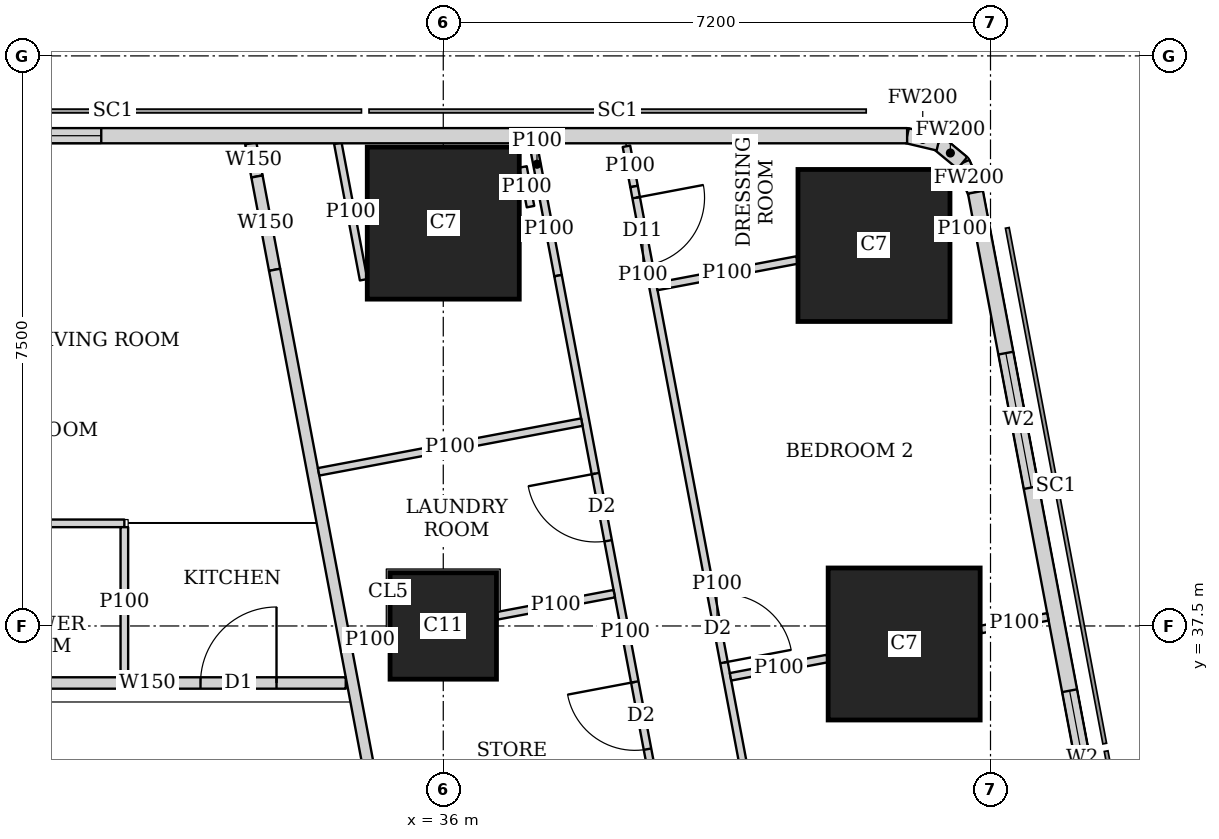
"""IFC4 building model, lengths in metres.
Left out: names, types, materials, properties, quantities, classifications, styles, units other than length and angle.
Written with IfcOpenShell. Run it as: python <this file> out.ifc"""

import sys

from ifc_helpers import new_model, si_unit, direction, frame, frame_2d, origin, origin_2d, place, context, subcontext, project, spatial, rectangle, extrude, element, fill, save


model = new_model("IFC4")
c1 = context("Model", 3, precision=1e-05, world=origin(), true_north=direction((0.0, 1.0)))
c2 = subcontext(c1, "Body", "Model", "MODEL_VIEW")
j1 = project(units=[si_unit("LENGTHUNIT", "METRE"), si_unit("PLANEANGLEUNIT", "RADIAN")], contexts=[c1])
p1 = place(None, origin())
s1 = spatial("IfcSite", under=j1, at=p1, CompositionType="ELEMENT")
p2 = place(p1, origin())
s2 = spatial("IfcBuilding", under=s1, at=p2, CompositionType="ELEMENT")
p3 = place(p2, frame((0.0, 0.0, 274.1)))
s3 = spatial("IfcBuildingStorey", under=s2, at=p3, CompositionType="ELEMENT", Elevation=274.1)
p4 = place(p3, frame((36.0, 37.5, 0.0), z_axis=(0.0, 0.0, 1.0), x_axis=(1.0, 0.0, 0.0)))
e1 = element("IfcColumn", 1, at=p4, inside=s3, PredefinedType="COLUMN", context=c2, shape_type="SweptSolid", body=[
    extrude(rectangle(XDim=1.4, YDim=1.4, at=origin_2d()), origin(), (0.0, 0.0, 1.0), 3.75),
])
for number, where, z_axis, x_axis in (
    (2, (42.064, 37.263, 0.0), (0.0, 0.0, 1.0), (1.0, 0.0, 0.0)),
    (3, (36.0, 42.8, 0.0), (0.0, 0.0, 1.0), (1.0, 0.0, 0.0)),
    (4, (41.667, 42.506, 0.0), (0.0, 0.0, 1.0), (1.0, 0.0, 0.0)),
):
    element("IfcColumn", number, at=place(p3, frame(where, z_axis=z_axis, x_axis=x_axis)), inside=s3, PredefinedType="COLUMN", context=c2, shape_type="SweptSolid", body=[
        extrude(rectangle(XDim=2.0, YDim=2.0, at=origin_2d()), origin(), (0.0, 0.0, 1.0), 3.75),
    ])
p5 = place(p3, frame((49.684, 7.832, 0.0), z_axis=(0.0, 0.0, 1.0), x_axis=(-0.185616669694, 0.982622232565, 0.0)))
e5 = element("IfcWall", 5, at=p5, inside=s3, PredefinedType="SOLIDWALL", context=c2, shape_type="SweptSolid", body=[
    extrude(rectangle(XDim=36.0, YDim=0.2, at=frame_2d((18.0, 0.0))), origin(), (0.0, 0.0, 1.0), 3.5),
])
p6 = place(p5, frame((2.518, 0.0, 0.9)))
e6 = element("IfcOpeningElement", 6, at=p6, cuts=e5, PredefinedType="OPENING", context=c2, shape_type="SweptSolid", body=[
    extrude(rectangle(XDim=2.4, YDim=1.5, at=frame_2d((1.2, 0.75))), frame((0.0, 0.11, 0.0), z_axis=(0.0, -1.0, 0.0), x_axis=(1.0, 0.0, 0.0)), (0.0, 0.0, 1.0), 0.22),
])
p7 = place(p5, frame((8.444, 0.0, 0.9)))
e7 = element("IfcOpeningElement", 7, at=p7, cuts=e5, PredefinedType="OPENING", context=c2, shape_type="SweptSolid", body=[
    extrude(rectangle(XDim=1.8, YDim=1.5, at=frame_2d((0.9, 0.75))), frame((0.0, 0.11, 0.0), z_axis=(0.0, -1.0, 0.0), x_axis=(1.0, 0.0, 0.0)), (0.0, 0.0, 1.0), 0.22),
])
p8 = place(p5, frame((12.261, 0.0, 0.9)))
e8 = element("IfcOpeningElement", 8, at=p8, cuts=e5, PredefinedType="OPENING", context=c2, shape_type="SweptSolid", body=[
    extrude(rectangle(XDim=1.8, YDim=1.5, at=frame_2d((0.9, 0.75))), frame((0.0, 0.11, 0.0), z_axis=(0.0, -1.0, 0.0), x_axis=(1.0, 0.0, 0.0)), (0.0, 0.0, 1.0), 0.22),
])
p9 = place(p5, frame((16.078, 0.0, 0.9)))
e9 = element("IfcOpeningElement", 9, at=p9, cuts=e5, PredefinedType="OPENING", context=c2, shape_type="SweptSolid", body=[
    extrude(rectangle(XDim=1.8, YDim=1.5, at=frame_2d((0.9, 0.75))), frame((0.0, 0.11, 0.0), z_axis=(0.0, -1.0, 0.0), x_axis=(1.0, 0.0, 0.0)), (0.0, 0.0, 1.0), 0.22),
])
p10 = place(p5, frame((19.894, 0.0, 0.9)))
e10 = element("IfcOpeningElement", 10, at=p10, cuts=e5, PredefinedType="OPENING", context=c2, shape_type="SweptSolid", body=[
    extrude(rectangle(XDim=1.8, YDim=1.5, at=frame_2d((0.9, 0.75))), frame((0.0, 0.11, 0.0), z_axis=(0.0, -1.0, 0.0), x_axis=(1.0, 0.0, 0.0)), (0.0, 0.0, 1.0), 0.22),
])
p11 = place(p5, frame((23.71, 0.0, 0.9)))
e11 = element("IfcOpeningElement", 11, at=p11, cuts=e5, PredefinedType="OPENING", context=c2, shape_type="SweptSolid", body=[
    extrude(rectangle(XDim=1.8, YDim=1.5, at=frame_2d((0.9, 0.75))), frame((0.0, 0.11, 0.0), z_axis=(0.0, -1.0, 0.0), x_axis=(1.0, 0.0, 0.0)), (0.0, 0.0, 1.0), 0.22),
])
p12 = place(p5, frame((27.526, 0.0, 0.9)))
e12 = element("IfcOpeningElement", 12, at=p12, cuts=e5, PredefinedType="OPENING", context=c2, shape_type="SweptSolid", body=[
    extrude(rectangle(XDim=1.8, YDim=1.5, at=frame_2d((0.9, 0.75))), frame((0.0, 0.11, 0.0), z_axis=(0.0, -1.0, 0.0), x_axis=(1.0, 0.0, 0.0)), (0.0, 0.0, 1.0), 0.22),
])
p13 = place(p5, frame((32.046, 0.0, 0.9)))
e13 = element("IfcOpeningElement", 13, at=p13, cuts=e5, PredefinedType="OPENING", context=c2, shape_type="SweptSolid", body=[
    extrude(rectangle(XDim=1.8, YDim=1.5, at=frame_2d((0.9, 0.75))), frame((0.0, 0.11, 0.0), z_axis=(0.0, -1.0, 0.0), x_axis=(1.0, 0.0, 0.0)), (0.0, 0.0, 1.0), 0.22),
])
p14 = place(p3, frame((43.002, 43.206, 0.0), z_axis=(0.0, 0.0, 1.0), x_axis=(-0.40678170573, 0.913525393124, 0.0)))
e14 = element("IfcWall", 14, at=p14, inside=s3, PredefinedType="SOLIDWALL", context=c2, shape_type="SweptSolid", body=[
    extrude(rectangle(XDim=0.423, YDim=0.2, at=frame_2d((0.211, 0.0))), origin(), (0.0, 0.0, 1.0), 3.5),
])
p15 = place(p3, frame((42.83, 43.592, 0.0), z_axis=(0.0, 0.0, 1.0), x_axis=(-0.771190539797, 0.636604391539, 0.0)))
e15 = element("IfcWall", 15, at=p15, inside=s3, PredefinedType="SOLIDWALL", context=c2, shape_type="SweptSolid", body=[
    extrude(rectangle(XDim=0.41, YDim=0.2, at=frame_2d((0.205, 0.0))), origin(), (0.0, 0.0, 1.0), 3.5),
])
p16 = place(p3, frame((42.514, 43.853, 0.0), z_axis=(0.0, 0.0, 1.0), x_axis=(-0.973288080424, 0.229587265555, 0.0)))
e16 = element("IfcWall", 16, at=p16, inside=s3, PredefinedType="SOLIDWALL", context=c2, shape_type="SweptSolid", body=[
    extrude(rectangle(XDim=0.422, YDim=0.2, at=frame_2d((0.211, 0.0))), origin(), (0.0, 0.0, 1.0), 3.5),
])
p17 = place(p3, frame((42.103, 43.95, 0.0), z_axis=(0.0, 0.0, 1.0), x_axis=(-1.0, 0.0, 0.0)))
e17 = element("IfcWall", 17, at=p17, inside=s3, PredefinedType="SOLIDWALL", context=c2, shape_type="SweptSolid", body=[
    extrude(rectangle(XDim=27.54, YDim=0.2, at=frame_2d((13.77, 0.0))), origin(), (0.0, 0.0, 1.0), 3.5),
])
p18 = place(p17, frame((10.603, 0.0, 0.9)))
e18 = element("IfcOpeningElement", 18, at=p18, cuts=e17, PredefinedType="OPENING", context=c2, shape_type="SweptSolid", body=[
    extrude(rectangle(XDim=1.8, YDim=1.5, at=frame_2d((0.9, 0.75))), frame((0.0, 0.11, 0.0), z_axis=(0.0, -1.0, 0.0), x_axis=(1.0, 0.0, 0.0)), (0.0, 0.0, 1.0), 0.22),
])
p19 = place(p17, frame((14.203, 0.0, 0.9)))
e19 = element("IfcOpeningElement", 19, at=p19, cuts=e17, PredefinedType="OPENING", context=c2, shape_type="SweptSolid", body=[
    extrude(rectangle(XDim=1.8, YDim=1.5, at=frame_2d((0.9, 0.75))), frame((0.0, 0.11, 0.0), z_axis=(0.0, -1.0, 0.0), x_axis=(1.0, 0.0, 0.0)), (0.0, 0.0, 1.0), 0.22),
])
p20 = place(p17, frame((17.803, 0.0, 0.9)))
e20 = element("IfcOpeningElement", 20, at=p20, cuts=e17, PredefinedType="OPENING", context=c2, shape_type="SweptSolid", body=[
    extrude(rectangle(XDim=1.8, YDim=1.5, at=frame_2d((0.9, 0.75))), frame((0.0, 0.11, 0.0), z_axis=(0.0, -1.0, 0.0), x_axis=(1.0, 0.0, 0.0)), (0.0, 0.0, 1.0), 0.22),
])
p21 = place(p17, frame((22.822, 0.0, 0.9)))
e21 = element("IfcOpeningElement", 21, at=p21, cuts=e17, PredefinedType="OPENING", context=c2, shape_type="SweptSolid", body=[
    extrude(rectangle(XDim=2.4, YDim=1.5, at=frame_2d((1.2, 0.75))), frame((0.0, 0.11, 0.0), z_axis=(0.0, -1.0, 0.0), x_axis=(1.0, 0.0, 0.0)), (0.0, 0.0, 1.0), 0.22),
])
p22 = place(p3, frame((29.501, 36.75, 0.0), z_axis=(0.0, 0.0, 1.0), x_axis=(1.0, 0.0, 0.0)))
e22 = element("IfcWall", 22, at=p22, inside=s3, PredefinedType="SOLIDWALL", context=c2, shape_type="SweptSolid", body=[
    extrude(rectangle(XDim=5.216, YDim=0.15, at=frame_2d((2.608, 0.0))), origin(), (0.0, 0.0, 1.0), 3.5),
])
p23 = place(p22, frame((3.305, 0.0, 0.0)))
e23 = element("IfcOpeningElement", 23, at=p23, cuts=e22, PredefinedType="OPENING", context=c2, shape_type="SweptSolid", body=[
    extrude(rectangle(XDim=1.0, YDim=2.1, at=frame_2d((0.5, 1.05))), frame((0.0, 0.085, 0.0), z_axis=(0.0, -1.0, 0.0), x_axis=(1.0, 0.0, 0.0)), (0.0, 0.0, 1.0), 0.17),
])
p24 = place(p3, frame((33.467, 43.85, 0.0), z_axis=(0.0, 0.0, 1.0), x_axis=(0.184886516626, -0.982759877066, 0.0)))
e24 = element("IfcWall", 24, at=p24, inside=s3, PredefinedType="SOLIDWALL", context=c2, shape_type="SweptSolid", body=[
    extrude(rectangle(XDim=0.444, YDim=0.15, at=frame_2d((0.222, 0.0))), origin(), (0.0, 0.0, 1.0), 3.5),
])
p25 = place(p3, frame((33.549, 43.414, 0.0), z_axis=(0.0, 0.0, 1.0), x_axis=(0.185585816539, -0.982628060204, 0.0)))
e25 = element("IfcWall", 25, at=p25, inside=s3, PredefinedType="SOLIDWALL", context=c2, shape_type="SweptSolid", body=[
    extrude(rectangle(XDim=1.25, YDim=0.15, at=frame_2d((0.625, 0.0))), origin(), (0.0, 0.0, 1.0), 2.05),
])
p26 = place(p3, frame((33.781, 42.186, 0.0), z_axis=(0.0, 0.0, 1.0), x_axis=(0.185593518645, -0.9826266055, 0.0)))
e26 = element("IfcWall", 26, at=p26, inside=s3, PredefinedType="SOLIDWALL", context=c2, shape_type="SweptSolid", body=[
    extrude(rectangle(XDim=35.961, YDim=0.15, at=frame_2d((17.98, 0.0))), origin(), (0.0, 0.0, 1.0), 2.5),
])
p27 = place(p26, frame((11.76, 0.0, 0.0)))
e27 = element("IfcOpeningElement", 27, at=p27, cuts=e26, PredefinedType="OPENING", context=c2, shape_type="SweptSolid", body=[
    extrude(rectangle(XDim=1.0, YDim=2.1, at=frame_2d((0.5, 1.05))), frame((0.0, 0.085, 0.0), z_axis=(0.0, -1.0, 0.0), x_axis=(1.0, 0.0, 0.0)), (0.0, 0.0, 1.0), 0.17),
])
p28 = place(p26, frame((15.576, 0.0, 0.0)))
e28 = element("IfcOpeningElement", 28, at=p28, cuts=e26, PredefinedType="OPENING", context=c2, shape_type="SweptSolid", body=[
    extrude(rectangle(XDim=1.0, YDim=2.1, at=frame_2d((0.5, 1.05))), frame((0.0, 0.085, 0.0), z_axis=(0.0, -1.0, 0.0), x_axis=(1.0, 0.0, 0.0)), (0.0, 0.0, 1.0), 0.17),
])
p29 = place(p26, frame((30.502, 0.0, 0.0)))
e29 = element("IfcOpeningElement", 29, at=p29, cuts=e26, PredefinedType="OPENING", context=c2, shape_type="SweptSolid", body=[
    extrude(rectangle(XDim=1.0, YDim=2.1, at=frame_2d((0.5, 1.05))), frame((0.0, 0.085, 0.0), z_axis=(0.0, -1.0, 0.0), x_axis=(1.0, 0.0, 0.0)), (0.0, 0.0, 1.0), 0.17),
])
p30 = place(p3, frame((34.952, 42.055, 0.0), z_axis=(0.0, 0.0, 1.0), x_axis=(-0.185490642006, 0.98264603074, 0.0)))
e30 = element("IfcWall", 30, at=p30, inside=s3, PredefinedType="PARTITIONING", context=c2, shape_type="SweptSolid", body=[
    extrude(rectangle(XDim=1.827, YDim=0.1, at=frame_2d((0.914, 0.0))), origin(), (0.0, 0.0, 1.0), 2.05),
])
p31 = place(p3, frame((37.049, 43.539, 0.0), z_axis=(0.0, 0.0, 1.0), x_axis=(0.186119495745, -0.982527115811, 0.0)))
e31 = element("IfcWall", 31, at=p31, inside=s3, PredefinedType="PARTITIONING", context=c2, shape_type="SweptSolid", body=[
    extrude(rectangle(XDim=0.531, YDim=0.1, at=frame_2d((0.266, 0.0))), origin(), (0.0, 0.0, 1.0), 2.05),
])
p32 = place(p3, frame((38.41, 43.811, 0.0), z_axis=(0.0, 0.0, 1.0), x_axis=(0.185903499302, -0.982568007289, 0.0)))
e32 = element("IfcWall", 32, at=p32, inside=s3, PredefinedType="PARTITIONING", context=c2, shape_type="SweptSolid", body=[
    extrude(rectangle(XDim=0.538, YDim=0.1, at=frame_2d((0.269, 0.0))), origin(), (0.0, 0.0, 1.0), 3.5),
])
p33 = place(p3, frame((38.51, 43.282, 0.0), z_axis=(0.0, 0.0, 1.0), x_axis=(0.185775287495, -0.982592256511, 0.0)))
e33 = element("IfcWall", 33, at=p33, inside=s3, PredefinedType="PARTITIONING", context=c2, shape_type="SweptSolid", body=[
    extrude(rectangle(XDim=1.259, YDim=0.1, at=frame_2d((0.629, 0.0))), origin(), (0.0, 0.0, 1.0), 2.05),
])
p34 = place(p33, frame((0.15, 0.0, 0.0)))
e34 = element("IfcOpeningElement", 34, at=p34, cuts=e33, PredefinedType="OPENING", context=c2, shape_type="SweptSolid", body=[
    extrude(rectangle(XDim=0.9, YDim=2.0, at=frame_2d((0.45, 1.0))), frame((0.0, 0.06, 0.0), z_axis=(0.0, -1.0, 0.0), x_axis=(1.0, 0.0, 0.0)), (0.0, 0.0, 1.0), 0.12),
])
p35 = place(p3, frame((38.744, 42.045, 0.0), z_axis=(0.0, 0.0, 1.0), x_axis=(0.185588352162, -0.982627581305, 0.0)))
e35 = element("IfcWall", 35, at=p35, inside=s3, PredefinedType="PARTITIONING", context=c2, shape_type="SweptSolid", body=[
    extrude(rectangle(XDim=9.241, YDim=0.1, at=frame_2d((4.621, 0.0))), origin(), (0.0, 0.0, 1.0), 3.5),
])
p36 = place(p35, frame((8.191, 0.0, 0.0)))
e36 = element("IfcOpeningElement", 36, at=p36, cuts=e35, PredefinedType="OPENING", context=c2, shape_type="SweptSolid", body=[
    extrude(rectangle(XDim=0.9, YDim=2.1, at=frame_2d((0.45, 1.05))), frame((0.0, 0.06, 0.0), z_axis=(0.0, -1.0, 0.0), x_axis=(1.0, 0.0, 0.0)), (0.0, 0.0, 1.0), 0.12),
])
p37 = place(p35, frame((4.215, 0.0, 0.0)))
e37 = element("IfcOpeningElement", 37, at=p37, cuts=e35, PredefinedType="OPENING", context=c2, shape_type="SweptSolid", body=[
    extrude(rectangle(XDim=0.9, YDim=2.1, at=frame_2d((0.45, 1.05))), frame((0.0, 0.06, 0.0), z_axis=(0.0, -1.0, 0.0), x_axis=(1.0, 0.0, 0.0)), (0.0, 0.0, 1.0), 0.12),
])
p38 = place(p3, frame((37.19, 43.803, 0.0), z_axis=(0.0, 0.0, 1.0), x_axis=(0.18479566844, -0.982776963978, 0.0)))
e38 = element("IfcWall", 38, at=p38, inside=s3, PredefinedType="PARTITIONING", context=c2, shape_type="SweptSolid", body=[
    extrude(rectangle(XDim=0.465, YDim=0.1, at=frame_2d((0.232, 0.0))), origin(), (0.0, 0.0, 1.0), 3.5),
])
p39 = place(p3, frame((37.276, 43.346, 0.0), z_axis=(0.0, 0.0, 1.0), x_axis=(0.185962504646, -0.982556841544, 0.0)))
e39 = element("IfcWall", 39, at=p39, inside=s3, PredefinedType="PARTITIONING", context=c2, shape_type="SweptSolid", body=[
    extrude(rectangle(XDim=1.259, YDim=0.1, at=frame_2d((0.629, 0.0))), origin(), (0.0, 0.0, 1.0), 2.05),
])
p40 = place(p3, frame((37.51, 42.109, 0.0), z_axis=(0.0, 0.0, 1.0), x_axis=(0.185659798122, -0.982614084654, 0.0)))
e40 = element("IfcWall", 40, at=p40, inside=s3, PredefinedType="PARTITIONING", context=c2, shape_type="SweptSolid", body=[
    extrude(rectangle(XDim=9.534, YDim=0.1, at=frame_2d((4.767, 0.0))), origin(), (0.0, 0.0, 1.0), 3.5),
])
p41 = place(p40, frame((8.109, 0.0, 0.0)))
e41 = element("IfcOpeningElement", 41, at=p41, cuts=e40, PredefinedType="OPENING", context=c2, shape_type="SweptSolid", body=[
    extrude(rectangle(XDim=0.9, YDim=2.1, at=frame_2d((0.45, 1.05))), frame((0.0, 0.06, 0.0), z_axis=(0.0, -1.0, 0.0), x_axis=(1.0, 0.0, 0.0)), (0.0, 0.0, 1.0), 0.12),
])
p42 = place(p40, frame((2.65, 0.0, 0.0)))
e42 = element("IfcOpeningElement", 42, at=p42, cuts=e40, PredefinedType="OPENING", context=c2, shape_type="SweptSolid", body=[
    extrude(rectangle(XDim=0.9, YDim=2.1, at=frame_2d((0.45, 1.05))), frame((0.0, 0.06, 0.0), z_axis=(0.0, -1.0, 0.0), x_axis=(1.0, 0.0, 0.0)), (0.0, 0.0, 1.0), 0.12),
])
p43 = place(p40, frame((5.44, 0.0, 0.0)))
e43 = element("IfcOpeningElement", 43, at=p43, cuts=e40, PredefinedType="OPENING", context=c2, shape_type="SweptSolid", body=[
    extrude(rectangle(XDim=0.9, YDim=2.1, at=frame_2d((0.45, 1.05))), frame((0.0, 0.06, 0.0), z_axis=(0.0, -1.0, 0.0), x_axis=(1.0, 0.0, 0.0)), (0.0, 0.0, 1.0), 0.12),
])
p44 = place(p3, frame((42.985, 42.755, 0.0), z_axis=(0.0, 0.0, 1.0), x_axis=(-0.98281924824, -0.184570651215, 0.0)))
e44 = element("IfcWall", 44, at=p44, inside=s3, PredefinedType="PARTITIONING", context=c2, shape_type="SweptSolid", body=[
    extrude(rectangle(XDim=0.313, YDim=0.1, at=frame_2d((0.157, 0.0))), origin(), (0.0, 0.0, 1.0), 3.5),
])
p45 = place(p3, frame((40.657, 42.315, 0.0), z_axis=(0.0, 0.0, 1.0), x_axis=(-0.982640672055, -0.185519027661, 0.0)))
e45 = element("IfcWall", 45, at=p45, inside=s3, PredefinedType="PARTITIONING", context=c2, shape_type="SweptSolid", body=[
    extrude(rectangle(XDim=1.881, YDim=0.1, at=frame_2d((0.94, 0.0))), origin(), (0.0, 0.0, 1.0), 2.05),
])
p46 = place(p3, frame((43.955, 37.62, 0.0), z_axis=(0.0, 0.0, 1.0), x_axis=(-0.982708424405, -0.18515980288, 0.0)))
e46 = element("IfcWall", 46, at=p46, inside=s3, PredefinedType="PARTITIONING", context=c2, shape_type="SweptSolid", body=[
    extrude(rectangle(XDim=0.897, YDim=0.1, at=frame_2d((0.448, 0.0))), origin(), (0.0, 0.0, 1.0), 3.5),
])
p47 = place(p3, frame((41.054, 37.072, 0.0), z_axis=(0.0, 0.0, 1.0), x_axis=(-0.982602741717, -0.185719821156, 0.0)))
e47 = element("IfcWall", 47, at=p47, inside=s3, PredefinedType="PARTITIONING", context=c2, shape_type="SweptSolid", body=[
    extrude(rectangle(XDim=1.297, YDim=0.1, at=frame_2d((0.649, 0.0))), origin(), (0.0, 0.0, 1.0), 3.5),
])
p48 = place(p3, frame((37.823, 40.182, 0.0), z_axis=(0.0, 0.0, 1.0), x_axis=(-0.98263926043, -0.185526504472, 0.0)))
e48 = element("IfcWall", 48, at=p48, inside=s3, PredefinedType="PARTITIONING", context=c2, shape_type="SweptSolid", body=[
    extrude(rectangle(XDim=3.524, YDim=0.1, at=frame_2d((1.762, 0.0))), origin(), (0.0, 0.0, 1.0), 3.5),
])
p49 = place(p3, frame((38.25, 37.925, 0.0), z_axis=(0.0, 0.0, 1.0), x_axis=(-0.982610209589, -0.185680305934, 0.0)))
e49 = element("IfcWall", 49, at=p49, inside=s3, PredefinedType="PARTITIONING", context=c2, shape_type="SweptSolid", body=[
    extrude(rectangle(XDim=1.567, YDim=0.1, at=frame_2d((0.784, 0.0))), origin(), (0.0, 0.0, 1.0), 3.5),
])
p50 = place(p3, frame((35.29, 37.366, 0.0), z_axis=(0.0, 0.0, 1.0), x_axis=(-0.982715597703, -0.185121727606, 0.0)))
e50 = element("IfcWall", 50, at=p50, inside=s3, PredefinedType="PARTITIONING", context=c2, shape_type="SweptSolid", body=[
    extrude(rectangle(XDim=0.513, YDim=0.1, at=frame_2d((0.256, 0.0))), origin(), (0.0, 0.0, 1.0), 3.5),
])
p51 = place(p3, frame((28.925, 38.85, 0.0), z_axis=(0.0, 0.0, 1.0), x_axis=(1.0, 0.0, 0.0)))
e51 = element("IfcWall", 51, at=p51, inside=s3, PredefinedType="PARTITIONING", context=c2, shape_type="SweptSolid", body=[
    extrude(rectangle(XDim=2.879, YDim=0.1, at=frame_2d((1.439, 0.0))), origin(), (0.0, 0.0, 1.0), 3.5),
])
p52 = place(p51, frame((0.925, 0.0, 0.0)))
e52 = element("IfcOpeningElement", 52, at=p52, cuts=e51, PredefinedType="OPENING", context=c2, shape_type="SweptSolid", body=[
    extrude(rectangle(XDim=0.9, YDim=2.1, at=frame_2d((0.45, 1.05))), frame((0.0, 0.06, 0.0), z_axis=(0.0, -1.0, 0.0), x_axis=(1.0, 0.0, 0.0)), (0.0, 0.0, 1.0), 0.12),
])
p53 = place(p3, frame((31.804, 36.825, 0.0), z_axis=(0.0, 0.0, 1.0), x_axis=(0.0, 1.0, 0.0)))
e53 = element("IfcWall", 53, at=p53, inside=s3, PredefinedType="PARTITIONING", context=c2, shape_type="SweptSolid", body=[
    extrude(rectangle(XDim=1.975, YDim=0.1, at=frame_2d((0.988, 0.0))), origin(), (0.0, 0.0, 1.0), 3.5),
])
p54 = place(p12, origin())
e54 = element("IfcWindow", 54, at=p54, inside=s3, PartitioningType="SINGLE_PANEL", PredefinedType="WINDOW", context=c2, shape_type="SweptSolid", body=[
    extrude(rectangle(XDim=1.8, YDim=1.5, at=frame_2d((0.9, 0.75))), frame((0.0, 0.03, 0.0), z_axis=(0.0, -1.0, 0.0), x_axis=(1.0, 0.0, 0.0)), (0.0, 0.0, 1.0), 0.06),
])
fill(e12, e54)
p55 = place(p13, origin())
e55 = element("IfcWindow", 55, at=p55, inside=s3, PartitioningType="SINGLE_PANEL", PredefinedType="WINDOW", context=c2, shape_type="SweptSolid", body=[
    extrude(rectangle(XDim=1.8, YDim=1.5, at=frame_2d((0.9, 0.75))), frame((0.0, 0.03, 0.0), z_axis=(0.0, -1.0, 0.0), x_axis=(1.0, 0.0, 0.0)), (0.0, 0.0, 1.0), 0.06),
])
fill(e13, e55)
p56 = place(p18, origin())
e56 = element("IfcWindow", 56, at=p56, inside=s3, PartitioningType="SINGLE_PANEL", PredefinedType="WINDOW", context=c2, shape_type="SweptSolid", body=[
    extrude(rectangle(XDim=1.8, YDim=1.5, at=frame_2d((0.9, 0.75))), frame((0.0, 0.03, 0.0), z_axis=(0.0, -1.0, 0.0), x_axis=(1.0, 0.0, 0.0)), (0.0, 0.0, 1.0), 0.06),
])
fill(e18, e56)
p57 = place(p34, origin())
e57 = element("IfcDoor", 57, at=p57, inside=s3, OperationType="SINGLE_SWING_LEFT", PredefinedType="DOOR", context=c2, shape_type="SweptSolid", body=[
    extrude(rectangle(XDim=0.9, YDim=2.0, at=frame_2d((0.45, 1.0))), frame((0.0, 0.025, 0.0), z_axis=(0.0, -1.0, 0.0), x_axis=(1.0, 0.0, 0.0)), (0.0, 0.0, 1.0), 0.05),
])
fill(e34, e57)
p58 = place(p37, origin())
e58 = element("IfcDoor", 58, at=p58, inside=s3, OperationType="SINGLE_SWING_RIGHT", PredefinedType="DOOR", context=c2, shape_type="SweptSolid", body=[
    extrude(rectangle(XDim=0.9, YDim=2.1, at=frame_2d((0.45, 1.05))), frame((0.0, 0.025, 0.0), z_axis=(0.0, -1.0, 0.0), x_axis=(1.0, 0.0, 0.0)), (0.0, 0.0, 1.0), 0.05),
])
fill(e37, e58)
p59 = place(p42, origin())
e59 = element("IfcDoor", 59, at=p59, inside=s3, OperationType="SINGLE_SWING_RIGHT", PredefinedType="DOOR", context=c2, shape_type="SweptSolid", body=[
    extrude(rectangle(XDim=0.9, YDim=2.1, at=frame_2d((0.45, 1.05))), frame((0.0, 0.025, 0.0), z_axis=(0.0, -1.0, 0.0), x_axis=(1.0, 0.0, 0.0)), (0.0, 0.0, 1.0), 0.05),
])
fill(e42, e59)
p60 = place(p43, origin())
e60 = element("IfcDoor", 60, at=p60, inside=s3, OperationType="SINGLE_SWING_RIGHT", PredefinedType="DOOR", context=c2, shape_type="SweptSolid", body=[
    extrude(rectangle(XDim=0.9, YDim=2.1, at=frame_2d((0.45, 1.05))), frame((0.0, 0.025, 0.0), z_axis=(0.0, -1.0, 0.0), x_axis=(1.0, 0.0, 0.0)), (0.0, 0.0, 1.0), 0.05),
])
fill(e43, e60)
p61 = place(p23, origin())
e61 = element("IfcDoor", 61, at=p61, inside=s3, OperationType="SINGLE_SWING_RIGHT", PredefinedType="DOOR", context=c2, shape_type="SweptSolid", body=[
    extrude(rectangle(XDim=1.0, YDim=2.1, at=frame_2d((0.5, 1.05))), frame((0.0, 0.025, 0.0), z_axis=(0.0, -1.0, 0.0), x_axis=(1.0, 0.0, 0.0)), (0.0, 0.0, 1.0), 0.05),
])
fill(e23, e61)
save(model, sys.argv[1])
